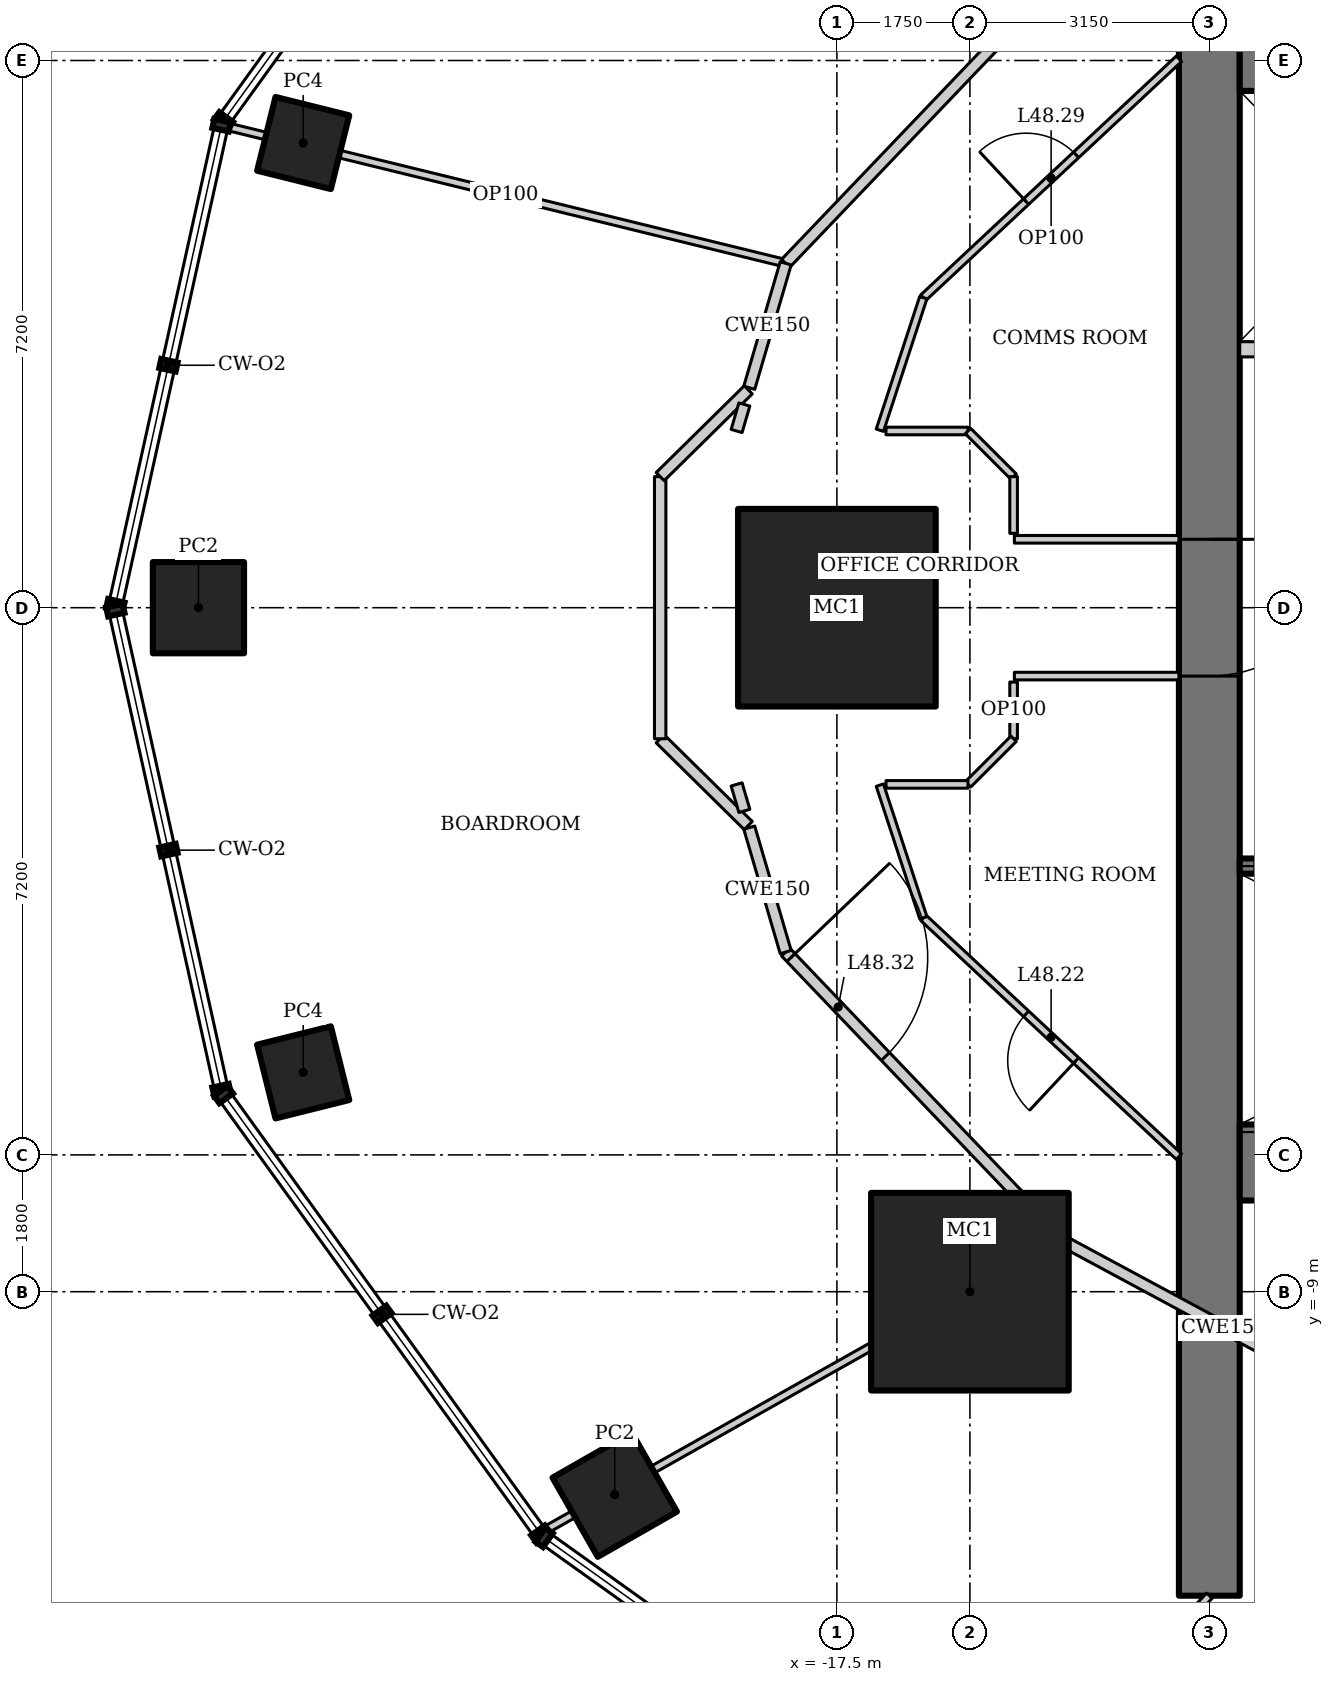
"""IFC4 building model, lengths in metres.
Left out: names, types, materials, properties, quantities, classifications, styles, units other than length and angle.
Written with IfcOpenShell. Run it as: python <this file> out.ifc"""

import sys

from ifc_helpers import new_model, si_unit, direction, frame, frame_2d, origin, origin_2d, place, context, subcontext, project, spatial, rectangle, hollow_rectangle, extrude, element, fill, save


model = new_model("IFC4")
c1 = context("Model", 3, precision=1e-05, world=origin(), true_north=direction((0.0, 1.0)))
c2 = subcontext(c1, "Body", "Model", "MODEL_VIEW")
j1 = project(units=[si_unit("LENGTHUNIT", "METRE"), si_unit("PLANEANGLEUNIT", "RADIAN")], contexts=[c1])
p1 = place(None, origin())
s1 = spatial("IfcSite", under=j1, at=p1, CompositionType="ELEMENT")
p2 = place(p1, origin())
s2 = spatial("IfcBuilding", under=s1, at=p2, CompositionType="ELEMENT")
p3 = place(p2, frame((0.0, 0.0, 207.4)))
s3 = spatial("IfcBuildingStorey", under=s2, at=p3, CompositionType="ELEMENT", Elevation=207.4)
for number, where, z_axis, x_axis in (
    (1, (-17.5, 0.0, 0.0), (0.0, 0.0, 1.0), (1.0, 0.0, 0.0)),
    (2, (-15.75, -9.0, 0.0), (0.0, 0.0, 1.0), (1.0, 0.0, 0.0)),
):
    element("IfcColumn", number, at=place(p3, frame(where, z_axis=z_axis, x_axis=x_axis)), inside=s3, PredefinedType="COLUMN", context=c2, shape_type="SweptSolid", body=[
        extrude(hollow_rectangle(XDim=2.6, YDim=2.6, WallThickness=0.13, at=origin_2d()), origin(), (0.0, 0.0, 1.0), 4.2),
    ])
p4 = place(p3, frame((-24.522, 6.114, 0.0), z_axis=(0.0, 0.0, 1.0), x_axis=(0.2419218956, 0.970295726276, 0.0)))
e3 = element("IfcColumn", 3, at=p4, inside=s3, PredefinedType="COLUMN", context=c2, shape_type="SweptSolid", body=[
    extrude(hollow_rectangle(XDim=1.0, YDim=1.0, WallThickness=0.08, at=origin_2d()), origin(), (0.0, 0.0, 1.0), 4.2),
])
p5 = place(p3, frame((-25.9, 0.0, 0.0), z_axis=(0.0, 0.0, 1.0), x_axis=(1.0, 0.0, 0.0)))
e4 = element("IfcColumn", 4, at=p5, inside=s3, PredefinedType="COLUMN", context=c2, shape_type="SweptSolid", body=[
    extrude(hollow_rectangle(XDim=1.2, YDim=1.2, WallThickness=0.1, at=origin_2d()), origin(), (0.0, 0.0, 1.0), 4.2),
])
p6 = place(p3, frame((-24.522, -6.114, 0.0), z_axis=(0.0, 0.0, 1.0), x_axis=(0.970295726276, 0.2419218956, 0.0)))
e5 = element("IfcColumn", 5, at=p6, inside=s3, PredefinedType="COLUMN", context=c2, shape_type="SweptSolid", body=[
    extrude(hollow_rectangle(XDim=1.0, YDim=1.0, WallThickness=0.08, at=origin_2d()), origin(), (0.0, 0.0, 1.0), 4.2),
])
p7 = place(p3, frame((-20.423, -11.67, 0.0), z_axis=(0.0, 0.0, 1.0), x_axis=(0.86824298017, 0.496139221777, 0.0)))
e6 = element("IfcColumn", 6, at=p7, inside=s3, PredefinedType="COLUMN", context=c2, shape_type="SweptSolid", body=[
    extrude(hollow_rectangle(XDim=1.2, YDim=1.2, WallThickness=0.1, at=origin_2d()), origin(), (0.0, 0.0, 1.0), 4.2),
])
p8 = place(p3, frame((-12.6, 13.0, 0.0), z_axis=(0.0, 0.0, 1.0), x_axis=(0.0, -1.0, 0.0)))
e7 = element("IfcWall", 7, at=p8, inside=s3, PredefinedType="SHEAR", context=c2, shape_type="SweptSolid", body=[
    extrude(rectangle(XDim=26.0, YDim=0.8, at=frame_2d((13.0, 0.0))), origin(), (0.0, 0.0, 1.0), 4.2),
])
p9 = place(p8, frame((12.1, 0.0, 0.0)))
e8 = element("IfcOpeningElement", 8, at=p9, cuts=e7, PredefinedType="OPENING", context=c2, shape_type="SweptSolid", body=[
    extrude(rectangle(XDim=1.8, YDim=2.1, at=frame_2d((0.9, 1.05))), frame((0.0, 0.41, 0.0), z_axis=(0.0, -1.0, 0.0), x_axis=(1.0, 0.0, 0.0)), (0.0, 0.0, 1.0), 0.82),
])
p10 = place(p3, frame((-12.2, -7.3, 0.0), z_axis=(0.0, 0.0, 1.0), x_axis=(1.0, 0.0, 0.0)))
e9 = element("IfcWall", 9, at=p10, inside=s3, PredefinedType="SHEAR", context=c2, shape_type="SweptSolid", body=[
    extrude(rectangle(XDim=24.4, YDim=1.0, at=frame_2d((12.2, 0.0))), origin(), (0.0, 0.0, 1.0), 4.2),
])
p11 = place(p3, frame((-5.6, 7.3, 0.0), z_axis=(0.0, 0.0, 1.0), x_axis=(-1.0, 0.0, 0.0)))
e10 = element("IfcWall", 10, at=p11, inside=s3, PredefinedType="SHEAR", context=c2, shape_type="SweptSolid", body=[
    extrude(rectangle(XDim=6.6, YDim=1.0, at=frame_2d((3.3, 0.0))), origin(), (0.0, 0.0, 1.0), 4.2),
])
p12 = place(p3, frame((-5.6, -3.4, 0.0), z_axis=(0.0, 0.0, 1.0), x_axis=(-1.0, 0.0, 0.0)))
e11 = element("IfcWall", 11, at=p12, inside=s3, PredefinedType="SHEAR", context=c2, shape_type="SweptSolid", body=[
    extrude(rectangle(XDim=6.6, YDim=0.2, at=frame_2d((3.3, 0.0))), origin(), (0.0, 0.0, 1.0), 4.2),
])
p13 = place(p12, frame((5.2, 0.0, 0.0)))
e12 = element("IfcOpeningElement", 12, at=p13, cuts=e11, PredefinedType="OPENING", context=c2, shape_type="SweptSolid", body=[
    extrude(rectangle(XDim=1.2, YDim=2.1, at=frame_2d((0.6, 1.05))), frame((0.0, 0.11, 0.0), z_axis=(0.0, -1.0, 0.0), x_axis=(1.0, 0.0, 0.0)), (0.0, 0.0, 1.0), 0.22),
])
p14 = place(p3, frame((-12.2, 3.4, 0.0), z_axis=(0.0, 0.0, 1.0), x_axis=(1.0, 0.0, 0.0)))
e13 = element("IfcWall", 13, at=p14, inside=s3, PredefinedType="SOLIDWALL", context=c2, shape_type="SweptSolid", body=[
    extrude(rectangle(XDim=6.6, YDim=0.2, at=frame_2d((3.3, 0.0))), origin(), (0.0, 0.0, 1.0), 4.2),
])
p15 = place(p14, frame((1.05, 0.0, 0.0)))
e14 = element("IfcOpeningElement", 14, at=p15, cuts=e13, PredefinedType="OPENING", context=c2, shape_type="SweptSolid", body=[
    extrude(rectangle(XDim=1.1, YDim=2.2, at=frame_2d((0.55, 1.1))), frame((0.0, 0.11, 0.0), z_axis=(0.0, -1.0, 0.0), x_axis=(1.0, 0.0, 0.0)), (0.0, 0.0, 1.0), 0.22),
])
p16 = place(p14, frame((4.3, 0.0, 0.0)))
e15 = element("IfcOpeningElement", 15, at=p16, cuts=e13, PredefinedType="OPENING", context=c2, shape_type="SweptSolid", body=[
    extrude(rectangle(XDim=1.4, YDim=2.2, at=frame_2d((0.7, 1.1))), frame((0.0, 0.11, 0.0), z_axis=(0.0, -1.0, 0.0), x_axis=(1.0, 0.0, 0.0)), (0.0, 0.0, 1.0), 0.22),
])
p17 = place(p3, frame((-25.543, 6.336, 0.0), z_axis=(0.0, 0.0, 1.0), x_axis=(0.97130474594, -0.237838370569, 0.0)))
e16 = element("IfcWall", 16, at=p17, inside=s3, PredefinedType="PARTITIONING", context=c2, shape_type="SweptSolid", body=[
    extrude(rectangle(XDim=7.587, YDim=0.1, at=frame_2d((3.793, 0.0))), origin(), (0.0, 0.0, 1.0), 3.108),
])
p18 = place(p3, frame((-21.358, -12.15, 0.0), z_axis=(0.0, 0.0, 1.0), x_axis=(0.871273053995, 0.490798599614, 0.0)))
e17 = element("IfcWall", 17, at=p18, inside=s3, PredefinedType="PARTITIONING", context=c2, shape_type="SweptSolid", body=[
    extrude(rectangle(XDim=7.807, YDim=0.1, at=frame_2d((3.904, 0.0))), origin(), (0.0, 0.0, 1.0), 3.524),
])
p19 = place(p3, frame((-14.556, 8.318, 0.0), z_axis=(0.0, 0.0, 1.0), x_axis=(-0.690768413292, -0.723076067366, 0.0)))
e18 = element("IfcWall", 18, at=p19, inside=s3, PredefinedType="PARTITIONING", context=c2, shape_type="SweptSolid", body=[
    extrude(rectangle(XDim=5.237, YDim=0.15, at=frame_2d((2.618, 0.0))), origin(), (0.0, 0.0, 1.0), 4.05),
])
p20 = place(p3, frame((-18.174, -4.531, 0.0), z_axis=(0.0, 0.0, 1.0), x_axis=(0.690768413292, -0.723076067366, 0.0)))
e19 = element("IfcWall", 19, at=p20, inside=s3, PredefinedType="PARTITIONING", context=c2, shape_type="SweptSolid", body=[
    extrude(rectangle(XDim=5.237, YDim=0.15, at=frame_2d((2.618, 0.0))), origin(), (0.0, 0.0, 1.0), 4.05),
])
p21 = place(p20, frame((0.1, 0.0, 0.0)))
e20 = element("IfcOpeningElement", 20, at=p21, cuts=e19, PredefinedType="OPENING", context=c2, shape_type="SweptSolid", body=[
    extrude(rectangle(XDim=1.8, YDim=2.1, at=frame_2d((0.9, 1.05))), frame((0.0, 0.085, 0.0), z_axis=(0.0, -1.0, 0.0), x_axis=(1.0, 0.0, 0.0)), (0.0, 0.0, 1.0), 0.17),
])
p22 = place(p3, frame((-14.556, -8.318, 0.0), z_axis=(0.0, 0.0, 1.0), x_axis=(0.88053863253, -0.47397438393, 0.0)))
e21 = element("IfcWall", 21, at=p22, inside=s3, PredefinedType="PARTITIONING", context=c2, shape_type="SweptSolid", body=[
    extrude(rectangle(XDim=4.875, YDim=0.15, at=frame_2d((2.438, 0.0))), origin(), (0.0, 0.0, 1.0), 4.05),
])
p23 = place(p3, frame((-13.0, -7.222, 0.0), z_axis=(0.0, 0.0, 1.0), x_axis=(-0.730651186567, 0.682750938167, 0.0)))
e22 = element("IfcWall", 22, at=p23, inside=s3, PredefinedType="PARTITIONING", context=c2, shape_type="SweptSolid", body=[
    extrude(rectangle(XDim=4.603, YDim=0.1, at=frame_2d((2.301, 0.0))), origin(), (0.0, 0.0, 1.0), 4.05),
])
p24 = place(p23, frame((1.851, 0.0, 0.0)))
e23 = element("IfcOpeningElement", 23, at=p24, cuts=e22, PredefinedType="OPENING", context=c2, shape_type="SweptSolid", body=[
    extrude(rectangle(XDim=0.9, YDim=2.1, at=frame_2d((0.45, 1.05))), frame((0.0, 0.06, 0.0), z_axis=(0.0, -1.0, 0.0), x_axis=(1.0, 0.0, 0.0)), (0.0, 0.0, 1.0), 0.12),
])
p25 = place(p3, frame((-16.363, 4.08, 0.0), z_axis=(0.0, 0.0, 1.0), x_axis=(0.730651186567, 0.682750938167, 0.0)))
e24 = element("IfcWall", 24, at=p25, inside=s3, PredefinedType="PARTITIONING", context=c2, shape_type="SweptSolid", body=[
    extrude(rectangle(XDim=4.603, YDim=0.1, at=frame_2d((2.301, 0.0))), origin(), (0.0, 0.0, 1.0), 4.05),
])
p26 = place(p25, frame((1.851, 0.0, 0.0)))
e25 = element("IfcOpeningElement", 25, at=p26, cuts=e24, PredefinedType="OPENING", context=c2, shape_type="SweptSolid", body=[
    extrude(rectangle(XDim=0.9, YDim=2.1, at=frame_2d((0.45, 1.05))), frame((0.0, 0.06, 0.0), z_axis=(0.0, -1.0, 0.0), x_axis=(1.0, 0.0, 0.0)), (0.0, 0.0, 1.0), 0.12),
])
p27 = place(p3, frame((-12.6, -13.0, 0.0), z_axis=(0.0, 0.0, 1.0), x_axis=(-0.682434118301, -0.730947107648, 0.0)))
e26 = element("IfcWall", 26, at=p27, inside=s3, PredefinedType="PARTITIONING", context=c2, shape_type="SweptSolid", body=[
    extrude(rectangle(XDim=2.702, YDim=0.1, at=frame_2d((1.351, 0.0))), origin(), (0.0, 0.0, 1.0), 3.41),
])
for number, where, z_axis, x_axis in (
    (27, (-18.174, 4.531, 0.0), (0.0, 0.0, 1.0), (-0.281, -0.96, 0.0)),
    (28, (-18.653, -2.894, 0.0), (0.0, 0.0, 1.0), (0.281, -0.96, 0.0)),
):
    element("IfcWall", number, at=place(p3, frame(where, z_axis=z_axis, x_axis=x_axis)), inside=s3, PredefinedType="PARTITIONING", context=c2, shape_type="SweptSolid", body=[
        extrude(rectangle(XDim=1.706, YDim=0.15, at=frame_2d((0.853, 0.0))), origin(), (0.0, 0.0, 1.0), 4.05),
    ])
p28 = place(p3, frame((-16.363, -4.08, 0.0), z_axis=(0.0, 0.0, 1.0), x_axis=(-0.311517212063, 0.950240509865, 0.0)))
e29 = element("IfcWall", 29, at=p28, inside=s3, PredefinedType="PARTITIONING", context=c2, shape_type="SweptSolid", body=[
    extrude(rectangle(XDim=1.836, YDim=0.1, at=frame_2d((0.918, 0.0))), origin(), (0.0, 0.0, 1.0), 4.05),
])
for number, where, z_axis, x_axis in (
    (30, (-15.165, -0.9, 0.0), (0.0, 0.0, 1.0), (1.0, 0.0, 0.0)),
    (31, (-13.0, 0.9, 0.0), (0.0, 0.0, 1.0), (-1.0, 0.0, 0.0)),
):
    element("IfcWall", number, at=place(p3, frame(where, z_axis=z_axis, x_axis=x_axis)), inside=s3, PredefinedType="PARTITIONING", context=c2, shape_type="SweptSolid", body=[
        extrude(rectangle(XDim=2.165, YDim=0.1, at=frame_2d((1.083, 0.0))), origin(), (0.0, 0.0, 1.0), 4.05),
    ])
p29 = place(p3, frame((-16.935, 2.335, 0.0), z_axis=(0.0, 0.0, 1.0), x_axis=(0.311517212063, 0.950240509865, 0.0)))
e32 = element("IfcWall", 32, at=p29, inside=s3, PredefinedType="PARTITIONING", context=c2, shape_type="SweptSolid", body=[
    extrude(rectangle(XDim=1.836, YDim=0.1, at=frame_2d((0.918, 0.0))), origin(), (0.0, 0.0, 1.0), 4.05),
])
p30 = place(p3, frame((-15.175, -0.978, 0.0), z_axis=(0.0, 0.0, 1.0), x_axis=(0.0, -1.0, 0.0)))
e33 = element("IfcWall", 33, at=p30, inside=s3, PredefinedType="PARTITIONING", context=c2, shape_type="SweptSolid", body=[
    extrude(rectangle(XDim=0.746, YDim=0.1, at=frame_2d((0.373, 0.0))), origin(), (0.0, 0.0, 1.0), 4.05),
])
p31 = place(p3, frame((-15.175, -1.725, 0.0), z_axis=(0.0, 0.0, 1.0), x_axis=(-0.707106781187, -0.707106781187, 0.0)))
e34 = element("IfcWall", 34, at=p31, inside=s3, PredefinedType="PARTITIONING", context=c2, shape_type="SweptSolid", body=[
    extrude(rectangle(XDim=0.849, YDim=0.1, at=frame_2d((0.425, 0.0))), origin(), (0.0, 0.0, 1.0), 4.05),
])
for number, where, z_axis, x_axis in (
    (35, (-15.775, -2.325, 0.0), (0.0, 0.0, 1.0), (-1.0, 0.0, 0.0)),
    (36, (-16.854, 2.325, 0.0), (0.0, 0.0, 1.0), (1.0, 0.0, 0.0)),
):
    element("IfcWall", number, at=place(p3, frame(where, z_axis=z_axis, x_axis=x_axis)), inside=s3, PredefinedType="PARTITIONING", context=c2, shape_type="SweptSolid", body=[
        extrude(rectangle(XDim=1.078, YDim=0.1, at=frame_2d((0.539, 0.0))), origin(), (0.0, 0.0, 1.0), 4.05),
    ])
p32 = place(p3, frame((-15.775, 2.325, 0.0), z_axis=(0.0, 0.0, 1.0), x_axis=(0.707106781187, -0.707106781187, 0.0)))
e37 = element("IfcWall", 37, at=p32, inside=s3, PredefinedType="PARTITIONING", context=c2, shape_type="SweptSolid", body=[
    extrude(rectangle(XDim=0.849, YDim=0.1, at=frame_2d((0.425, 0.0))), origin(), (0.0, 0.0, 1.0), 4.05),
])
p33 = place(p3, frame((-15.175, 1.725, 0.0), z_axis=(0.0, 0.0, 1.0), x_axis=(0.0, -1.0, 0.0)))
e38 = element("IfcWall", 38, at=p33, inside=s3, PredefinedType="PARTITIONING", context=c2, shape_type="SweptSolid", body=[
    extrude(rectangle(XDim=0.746, YDim=0.1, at=frame_2d((0.373, 0.0))), origin(), (0.0, 0.0, 1.0), 4.05),
])
p34 = place(p3, frame((-18.666, -2.866, 0.0), z_axis=(0.0, 0.0, 1.0), x_axis=(-0.712265481509, 0.701910167935, 0.0)))
e39 = element("IfcWall", 39, at=p34, inside=s3, PredefinedType="PARTITIONING", context=c2, shape_type="SweptSolid", body=[
    extrude(rectangle(XDim=1.627, YDim=0.15, at=frame_2d((0.813, 0.0))), origin(), (0.0, 0.0, 1.0), 4.05),
])
p35 = place(p3, frame((-19.825, -1.725, 0.0), z_axis=(0.0, 0.0, 1.0), x_axis=(0.0, 1.0, 0.0)))
e40 = element("IfcWall", 40, at=p35, inside=s3, PredefinedType="PARTITIONING", context=c2, shape_type="SweptSolid", body=[
    extrude(rectangle(XDim=3.449, YDim=0.15, at=frame_2d((1.725, 0.0))), origin(), (0.0, 0.0, 1.0), 4.05),
])
p36 = place(p3, frame((-19.825, 1.725, 0.0), z_axis=(0.0, 0.0, 1.0), x_axis=(0.712265481509, 0.701910167935, 0.0)))
e41 = element("IfcWall", 41, at=p36, inside=s3, PredefinedType="PARTITIONING", context=c2, shape_type="SweptSolid", body=[
    extrude(rectangle(XDim=1.627, YDim=0.15, at=frame_2d((0.813, 0.0))), origin(), (0.0, 0.0, 1.0), 4.05),
])
for number, where, z_axis, x_axis in (
    (42, (-18.717, 2.674, 0.0), (0.0, 0.0, 1.0), (-0.281, -0.96, 0.0)),
    (43, (-18.82, -2.325, 0.0), (0.0, 0.0, 1.0), (0.281, -0.96, 0.0)),
):
    element("IfcWall", number, at=place(p3, frame(where, z_axis=z_axis, x_axis=x_axis)), inside=s3, PredefinedType="PARTITIONING", context=c2, shape_type="SweptSolid", body=[
        extrude(rectangle(XDim=0.364, YDim=0.15, at=frame_2d((0.182, 0.0))), origin(), (0.0, 0.0, 1.0), 4.05),
    ])
p37 = place(p13, origin())
e44 = element("IfcDoor", 44, at=p37, inside=s3, OperationType="SINGLE_SWING_RIGHT", PredefinedType="DOOR", context=c2, shape_type="SweptSolid", body=[
    extrude(rectangle(XDim=1.2, YDim=2.1, at=frame_2d((0.6, 1.05))), frame((0.0, 0.025, 0.0), z_axis=(0.0, -1.0, 0.0), x_axis=(1.0, 0.0, 0.0)), (0.0, 0.0, 1.0), 0.05),
])
fill(e12, e44)
p38 = place(p9, origin())
e45 = element("IfcDoor", 45, at=p38, inside=s3, OperationType="DOUBLE_DOOR_DOUBLE_SWING", PredefinedType="DOOR", context=c2, shape_type="SweptSolid", body=[
    extrude(rectangle(XDim=1.8, YDim=2.1, at=frame_2d((0.9, 1.05))), frame((0.0, 0.025, 0.0), z_axis=(0.0, -1.0, 0.0), x_axis=(1.0, 0.0, 0.0)), (0.0, 0.0, 1.0), 0.05),
])
fill(e8, e45)
p39 = place(p24, origin())
e46 = element("IfcDoor", 46, at=p39, inside=s3, OperationType="SINGLE_SWING_LEFT", PredefinedType="DOOR", context=c2, shape_type="SweptSolid", body=[
    extrude(rectangle(XDim=0.9, YDim=2.1, at=frame_2d((0.45, 1.05))), frame((0.0, 0.025, 0.0), z_axis=(0.0, -1.0, 0.0), x_axis=(1.0, 0.0, 0.0)), (0.0, 0.0, 1.0), 0.05),
])
fill(e23, e46)
p40 = place(p26, origin())
e47 = element("IfcDoor", 47, at=p40, inside=s3, OperationType="SINGLE_SWING_LEFT", PredefinedType="DOOR", context=c2, shape_type="SweptSolid", body=[
    extrude(rectangle(XDim=0.9, YDim=2.1, at=frame_2d((0.45, 1.05))), frame((0.0, 0.025, 0.0), z_axis=(0.0, -1.0, 0.0), x_axis=(1.0, 0.0, 0.0)), (0.0, 0.0, 1.0), 0.05),
])
fill(e25, e47)
p41 = place(p21, origin())
e48 = element("IfcDoor", 48, at=p41, inside=s3, OperationType="DOUBLE_DOOR_DOUBLE_SWING", PredefinedType="DOOR", context=c2, shape_type="SweptSolid", body=[
    extrude(rectangle(XDim=1.8, YDim=2.1, at=frame_2d((0.9, 1.05))), frame((0.0, 0.025, 0.0), z_axis=(0.0, -1.0, 0.0), x_axis=(1.0, 0.0, 0.0)), (0.0, 0.0, 1.0), 0.05),
])
fill(e20, e48)
save(model, sys.argv[1])
